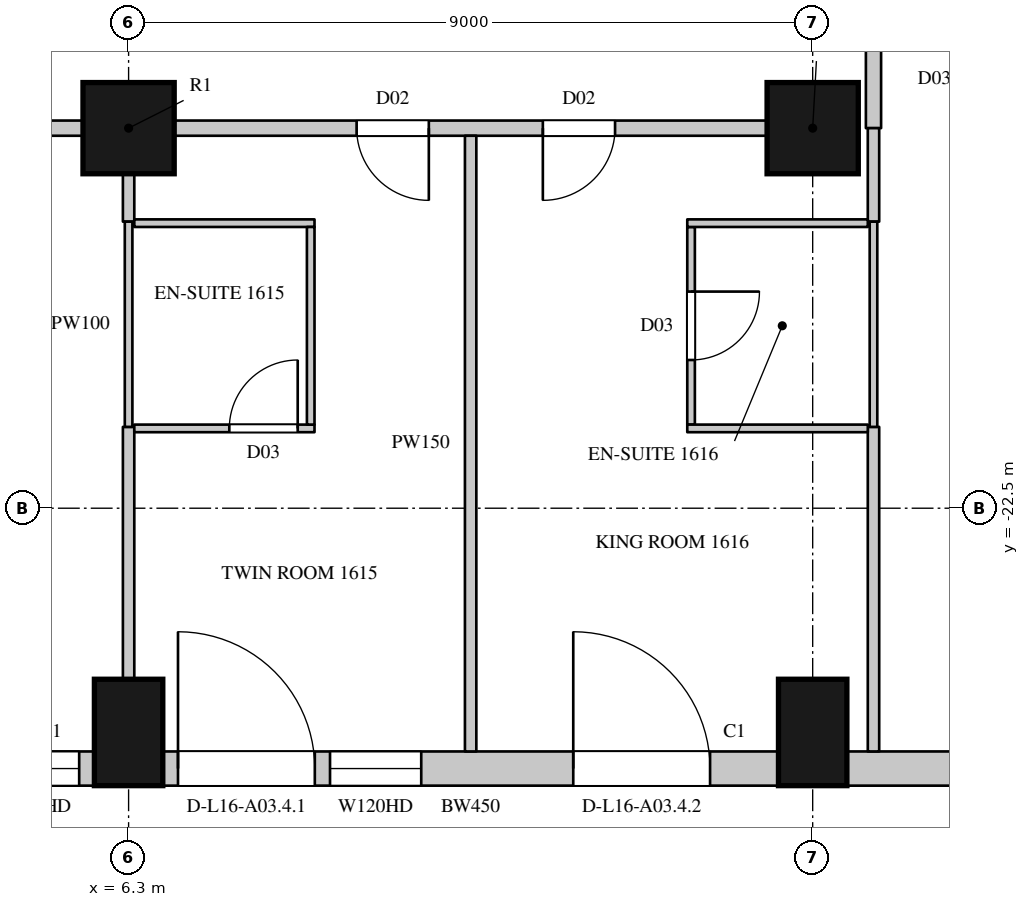
"""IFC4 building model, lengths in metres.
Left out: names, types, materials, properties, quantities, classifications, styles, units other than length and angle.
Written with IfcOpenShell. Run it as: python <this file> out.ifc"""

import sys

from ifc_helpers import new_model, si_unit, direction, frame, frame_2d, origin, origin_2d, place, context, subcontext, project, spatial, rectangle, circle, extrude, element, fill, save


model = new_model("IFC4")
c1 = context("Model", 3, precision=1e-05, world=origin(), true_north=direction((0.0, 1.0)))
c2 = subcontext(c1, "Body", "Model", "MODEL_VIEW")
j1 = project(units=[si_unit("LENGTHUNIT", "METRE"), si_unit("PLANEANGLEUNIT", "RADIAN")], contexts=[c1])
p1 = place(None, origin())
s1 = spatial("IfcSite", under=j1, at=p1, CompositionType="ELEMENT")
p2 = place(p1, origin())
s2 = spatial("IfcBuilding", under=s1, at=p2, CompositionType="ELEMENT")
p3 = place(p2, frame((0.0, 0.0, 87.9)))
s3 = spatial("IfcBuildingStorey", under=s2, at=p3, CompositionType="ELEMENT", Elevation=87.9)
for number, where, z_axis, x_axis in (
    (1, (6.3, -25.45, 0.0), (0.0, 0.0, 1.0), (1.0, 0.0, 0.0)),
    (2, (15.3, -25.45, 0.0), (0.0, 0.0, 1.0), (1.0, 0.0, 0.0)),
):
    element("IfcColumn", number, at=place(p3, frame(where, z_axis=z_axis, x_axis=x_axis)), inside=s3, PredefinedType="COLUMN", context=c2, shape_type="SweptSolid", body=[
        extrude(rectangle(XDim=0.9, YDim=1.4, at=origin_2d()), origin(), (0.0, 0.0, 1.0), 3.6),
    ])
for number, where, z_axis, x_axis in (
    (3, (6.3, -17.5, 0.0), (0.0, 0.0, 1.0), (1.0, 0.0, 0.0)),
    (4, (15.3, -17.5, 0.0), (0.0, 0.0, 1.0), (1.0, 0.0, 0.0)),
):
    element("IfcColumn", number, at=place(p3, frame(where, z_axis=z_axis, x_axis=x_axis)), inside=s3, PredefinedType="COLUMN", context=c2, shape_type="SweptSolid", body=[
        extrude(circle(Radius=0.6, at=origin_2d()), origin(), (0.0, 0.0, 1.0), 3.6),
    ])
p4 = place(p3, frame((-2.25, -25.925, 0.0), z_axis=(0.0, 0.0, 1.0), x_axis=(1.0, 0.0, 0.0)))
e5 = element("IfcWall", 5, at=p4, inside=s3, PredefinedType="SOLIDWALL", context=c2, shape_type="SweptSolid", body=[
    extrude(rectangle(XDim=8.1, YDim=0.45, at=frame_2d((4.05, 0.0))), origin(), (0.0, 0.0, 1.0), 3.3),
])
p5 = place(p4, frame((0.2, 0.0, 0.0)))
e6 = element("IfcOpeningElement", 6, at=p5, cuts=e5, PredefinedType="OPENING", context=c2, shape_type="SweptSolid", body=[
    extrude(rectangle(XDim=1.8, YDim=2.4, at=frame_2d((0.9, 1.2))), frame((0.0, 0.235, 0.0), z_axis=(0.0, -1.0, 0.0), x_axis=(1.0, 0.0, 0.0)), (0.0, 0.0, 1.0), 0.47),
])
p6 = place(p4, frame((2.2, 0.0, 1.05)))
e7 = element("IfcOpeningElement", 7, at=p6, cuts=e5, PredefinedType="OPENING", context=c2, shape_type="SweptSolid", body=[
    extrude(rectangle(XDim=1.2, YDim=2.0, at=frame_2d((0.6, 1.0))), frame((0.0, 0.235, 0.0), z_axis=(0.0, -1.0, 0.0), x_axis=(1.0, 0.0, 0.0)), (0.0, 0.0, 1.0), 0.47),
])
p7 = place(p4, frame((4.7, 0.0, 0.0)))
e8 = element("IfcOpeningElement", 8, at=p7, cuts=e5, PredefinedType="OPENING", context=c2, shape_type="SweptSolid", body=[
    extrude(rectangle(XDim=1.8, YDim=2.4, at=frame_2d((0.9, 1.2))), frame((0.0, 0.235, 0.0), z_axis=(0.0, -1.0, 0.0), x_axis=(1.0, 0.0, 0.0)), (0.0, 0.0, 1.0), 0.47),
])
p8 = place(p4, frame((6.7, 0.0, 1.05)))
e9 = element("IfcOpeningElement", 9, at=p8, cuts=e5, PredefinedType="OPENING", context=c2, shape_type="SweptSolid", body=[
    extrude(rectangle(XDim=1.2, YDim=2.0, at=frame_2d((0.6, 1.0))), frame((0.0, 0.235, 0.0), z_axis=(0.0, -1.0, 0.0), x_axis=(1.0, 0.0, 0.0)), (0.0, 0.0, 1.0), 0.47),
])
p9 = place(p3, frame((6.75, -25.925, 0.0), z_axis=(0.0, 0.0, 1.0), x_axis=(1.0, 0.0, 0.0)))
e10 = element("IfcWall", 10, at=p9, inside=s3, PredefinedType="SOLIDWALL", context=c2, shape_type="SweptSolid", body=[
    extrude(rectangle(XDim=8.1, YDim=0.45, at=frame_2d((4.05, 0.0))), origin(), (0.0, 0.0, 1.0), 3.3),
])
p10 = place(p9, frame((0.2, 0.0, 0.0)))
e11 = element("IfcOpeningElement", 11, at=p10, cuts=e10, PredefinedType="OPENING", context=c2, shape_type="SweptSolid", body=[
    extrude(rectangle(XDim=1.8, YDim=2.4, at=frame_2d((0.9, 1.2))), frame((0.0, 0.235, 0.0), z_axis=(0.0, -1.0, 0.0), x_axis=(1.0, 0.0, 0.0)), (0.0, 0.0, 1.0), 0.47),
])
p11 = place(p9, frame((2.2, 0.0, 1.05)))
e12 = element("IfcOpeningElement", 12, at=p11, cuts=e10, PredefinedType="OPENING", context=c2, shape_type="SweptSolid", body=[
    extrude(rectangle(XDim=1.2, YDim=2.0, at=frame_2d((0.6, 1.0))), frame((0.0, 0.235, 0.0), z_axis=(0.0, -1.0, 0.0), x_axis=(1.0, 0.0, 0.0)), (0.0, 0.0, 1.0), 0.47),
])
p12 = place(p9, frame((5.4, 0.0, 0.0)))
e13 = element("IfcOpeningElement", 13, at=p12, cuts=e10, PredefinedType="OPENING", context=c2, shape_type="SweptSolid", body=[
    extrude(rectangle(XDim=1.8, YDim=2.4, at=frame_2d((0.9, 1.2))), frame((0.0, 0.235, 0.0), z_axis=(0.0, -1.0, 0.0), x_axis=(1.0, 0.0, 0.0)), (0.0, 0.0, 1.0), 0.47),
])
p13 = place(p3, frame((15.75, -25.925, 0.0), z_axis=(0.0, 0.0, 1.0), x_axis=(1.0, 0.0, 0.0)))
e14 = element("IfcWall", 14, at=p13, inside=s3, PredefinedType="SOLIDWALL", context=c2, shape_type="SweptSolid", body=[
    extrude(rectangle(XDim=2.914, YDim=0.45, at=frame_2d((1.457, 0.0))), origin(), (0.0, 0.0, 1.0), 3.3),
])
p14 = place(p3, frame((-2.1, -17.5, 0.0), z_axis=(0.0, 0.0, 1.0), x_axis=(1.0, 0.0, 0.0)))
e15 = element("IfcWall", 15, at=p14, inside=s3, PredefinedType="PARTITIONING", context=c2, shape_type="SweptSolid", body=[
    extrude(rectangle(XDim=7.8, YDim=0.2, at=frame_2d((3.9, 0.0))), origin(), (0.0, 0.0, 1.0), 2.75),
])
p15 = place(p14, frame((4.15, 0.0, 0.0)))
e16 = element("IfcOpeningElement", 16, at=p15, cuts=e15, PredefinedType="OPENING", context=c2, shape_type="SweptSolid", body=[
    extrude(rectangle(XDim=0.95, YDim=2.2, at=frame_2d((0.475, 1.1))), frame((0.0, 0.11, 0.0), z_axis=(0.0, -1.0, 0.0), x_axis=(1.0, 0.0, 0.0)), (0.0, 0.0, 1.0), 0.22),
])
p16 = place(p3, frame((6.9, -17.5, 0.0), z_axis=(0.0, 0.0, 1.0), x_axis=(1.0, 0.0, 0.0)))
e17 = element("IfcWall", 17, at=p16, inside=s3, PredefinedType="PARTITIONING", context=c2, shape_type="SweptSolid", body=[
    extrude(rectangle(XDim=7.8, YDim=0.2, at=frame_2d((3.9, 0.0))), origin(), (0.0, 0.0, 1.0), 2.75),
])
p17 = place(p16, frame((2.4, 0.0, 0.0)))
e18 = element("IfcOpeningElement", 18, at=p17, cuts=e17, PredefinedType="OPENING", context=c2, shape_type="SweptSolid", body=[
    extrude(rectangle(XDim=0.95, YDim=2.2, at=frame_2d((0.475, 1.1))), frame((0.0, 0.11, 0.0), z_axis=(0.0, -1.0, 0.0), x_axis=(1.0, 0.0, 0.0)), (0.0, 0.0, 1.0), 0.22),
])
p18 = place(p16, frame((4.85, 0.0, 0.0)))
e19 = element("IfcOpeningElement", 19, at=p18, cuts=e17, PredefinedType="OPENING", context=c2, shape_type="SweptSolid", body=[
    extrude(rectangle(XDim=0.95, YDim=2.2, at=frame_2d((0.475, 1.1))), frame((0.0, 0.11, 0.0), z_axis=(0.0, -1.0, 0.0), x_axis=(1.0, 0.0, 0.0)), (0.0, 0.0, 1.0), 0.22),
])
p19 = place(p3, frame((16.1, -17.5, 0.0), z_axis=(0.0, 0.0, 1.0), x_axis=(0.0, 1.0, 0.0)))
e20 = element("IfcWall", 20, at=p19, inside=s3, PredefinedType="PARTITIONING", context=c2, shape_type="SweptSolid", body=[
    extrude(rectangle(XDim=12.75, YDim=0.2, at=frame_2d((6.375, 0.0))), origin(), (0.0, 0.0, 1.0), 3.3),
])
p20 = place(p19, frame((2.75, 0.0, 0.0)))
e21 = element("IfcOpeningElement", 21, at=p20, cuts=e20, PredefinedType="OPENING", context=c2, shape_type="SweptSolid", body=[
    extrude(rectangle(XDim=0.95, YDim=2.2, at=frame_2d((0.475, 1.1))), frame((0.0, 0.11, 0.0), z_axis=(0.0, -1.0, 0.0), x_axis=(1.0, 0.0, 0.0)), (0.0, 0.0, 1.0), 0.22),
])
p21 = place(p19, frame((6.95, 0.0, 0.0)))
e22 = element("IfcOpeningElement", 22, at=p21, cuts=e20, PredefinedType="OPENING", context=c2, shape_type="SweptSolid", body=[
    extrude(rectangle(XDim=0.95, YDim=2.2, at=frame_2d((0.475, 1.1))), frame((0.0, 0.11, 0.0), z_axis=(0.0, -1.0, 0.0), x_axis=(1.0, 0.0, 0.0)), (0.0, 0.0, 1.0), 0.22),
])
p22 = place(p19, frame((11.4, 0.0, 0.0)))
e23 = element("IfcOpeningElement", 23, at=p22, cuts=e20, PredefinedType="OPENING", context=c2, shape_type="SweptSolid", body=[
    extrude(rectangle(XDim=0.95, YDim=2.2, at=frame_2d((0.475, 1.1))), frame((0.0, 0.11, 0.0), z_axis=(0.0, -1.0, 0.0), x_axis=(1.0, 0.0, 0.0)), (0.0, 0.0, 1.0), 0.22),
])
p23 = place(p3, frame((6.3, -24.75, 0.0), z_axis=(0.0, 0.0, 1.0), x_axis=(0.0, 1.0, 0.0)))
e24 = element("IfcWall", 24, at=p23, inside=s3, PredefinedType="PARTITIONING", context=c2, shape_type="SweptSolid", body=[
    extrude(rectangle(XDim=3.32, YDim=0.15, at=frame_2d((1.66, 0.0))), origin(), (0.0, 0.0, 1.0), 2.75),
])
p24 = place(p3, frame((6.3, -18.73, 0.0), z_axis=(0.0, 0.0, 1.0), x_axis=(0.0, 1.0, 0.0)))
e25 = element("IfcWall", 25, at=p24, inside=s3, PredefinedType="PARTITIONING", context=c2, shape_type="SweptSolid", body=[
    extrude(rectangle(XDim=0.63, YDim=0.15, at=frame_2d((0.315, 0.0))), origin(), (0.0, 0.0, 1.0), 2.75),
])
p25 = place(p3, frame((10.8, -25.7, 0.0), z_axis=(0.0, 0.0, 1.0), x_axis=(0.0, 1.0, 0.0)))
e26 = element("IfcWall", 26, at=p25, inside=s3, PredefinedType="PARTITIONING", context=c2, shape_type="SweptSolid", body=[
    extrude(rectangle(XDim=8.1, YDim=0.15, at=frame_2d((4.05, 0.0))), origin(), (0.0, 0.0, 1.0), 2.65),
])
p26 = place(p3, frame((16.1, -25.7, 0.0), z_axis=(0.0, 0.0, 1.0), x_axis=(0.0, 1.0, 0.0)))
e27 = element("IfcWall", 27, at=p26, inside=s3, PredefinedType="PARTITIONING", context=c2, shape_type="SweptSolid", body=[
    extrude(rectangle(XDim=4.27, YDim=0.15, at=frame_2d((2.135, 0.0))), origin(), (0.0, 0.0, 1.0), 3.3),
])
p27 = place(p3, frame((16.1, -18.73, 0.0), z_axis=(0.0, 0.0, 1.0), x_axis=(0.0, 1.0, 0.0)))
e28 = element("IfcWall", 28, at=p27, inside=s3, PredefinedType="PARTITIONING", context=c2, shape_type="SweptSolid", body=[
    extrude(rectangle(XDim=1.23, YDim=0.15, at=frame_2d((0.615, 0.0))), origin(), (0.0, 0.0, 1.0), 3.3),
])
p28 = place(p3, frame((6.3, -21.43, 0.0), z_axis=(0.0, 0.0, 1.0), x_axis=(0.0, 1.0, 0.0)))
e29 = element("IfcWall", 29, at=p28, inside=s3, PredefinedType="PARTITIONING", context=c2, shape_type="SweptSolid", body=[
    extrude(rectangle(XDim=2.7, YDim=0.1, at=frame_2d((1.35, 0.0))), origin(), (0.0, 0.0, 1.0), 2.75),
])
p29 = place(p3, frame((6.375, -21.45, 0.0), z_axis=(0.0, 0.0, 1.0), x_axis=(1.0, 0.0, 0.0)))
e30 = element("IfcWall", 30, at=p29, inside=s3, PredefinedType="PARTITIONING", context=c2, shape_type="SweptSolid", body=[
    extrude(rectangle(XDim=2.371, YDim=0.1, at=frame_2d((1.186, 0.0))), origin(), (0.0, 0.0, 1.0), 3.3),
])
p30 = place(p29, frame((1.25, 0.0, 0.0)))
e31 = element("IfcOpeningElement", 31, at=p30, cuts=e30, PredefinedType="OPENING", context=c2, shape_type="SweptSolid", body=[
    extrude(rectangle(XDim=0.9, YDim=2.2, at=frame_2d((0.45, 1.1))), frame((0.0, 0.06, 0.0), z_axis=(0.0, -1.0, 0.0), x_axis=(1.0, 0.0, 0.0)), (0.0, 0.0, 1.0), 0.12),
])
p31 = place(p3, frame((6.375, -18.75, 0.0), z_axis=(0.0, 0.0, 1.0), x_axis=(1.0, 0.0, 0.0)))
e32 = element("IfcWall", 32, at=p31, inside=s3, PredefinedType="PARTITIONING", context=c2, shape_type="SweptSolid", body=[
    extrude(rectangle(XDim=2.371, YDim=0.1, at=frame_2d((1.186, 0.0))), origin(), (0.0, 0.0, 1.0), 3.3),
])
p32 = place(p3, frame((8.696, -21.4, 0.0), z_axis=(0.0, 0.0, 1.0), x_axis=(0.0, 1.0, 0.0)))
e33 = element("IfcWall", 33, at=p32, inside=s3, PredefinedType="PARTITIONING", context=c2, shape_type="SweptSolid", body=[
    extrude(rectangle(XDim=2.6, YDim=0.1, at=frame_2d((1.3, 0.0))), origin(), (0.0, 0.0, 1.0), 3.3),
])
p33 = place(p3, frame((13.7, -21.4, 0.0), z_axis=(0.0, 0.0, 1.0), x_axis=(0.0, 1.0, 0.0)))
e34 = element("IfcWall", 34, at=p33, inside=s3, PredefinedType="PARTITIONING", context=c2, shape_type="SweptSolid", body=[
    extrude(rectangle(XDim=2.6, YDim=0.1, at=frame_2d((1.3, 0.0))), origin(), (0.0, 0.0, 1.0), 3.3),
])
p34 = place(p33, frame((0.85, 0.0, 0.0)))
e35 = element("IfcOpeningElement", 35, at=p34, cuts=e34, PredefinedType="OPENING", context=c2, shape_type="SweptSolid", body=[
    extrude(rectangle(XDim=0.9, YDim=2.2, at=frame_2d((0.45, 1.1))), frame((0.0, 0.06, 0.0), z_axis=(0.0, -1.0, 0.0), x_axis=(1.0, 0.0, 0.0)), (0.0, 0.0, 1.0), 0.12),
])
for number, where, z_axis, x_axis in (
    (36, (13.65, -21.45, 0.0), (0.0, 0.0, 1.0), (1.0, 0.0, 0.0)),
    (37, (13.65, -18.75, 0.0), (0.0, 0.0, 1.0), (1.0, 0.0, 0.0)),
):
    element("IfcWall", number, at=place(p3, frame(where, z_axis=z_axis, x_axis=x_axis)), inside=s3, PredefinedType="PARTITIONING", context=c2, shape_type="SweptSolid", body=[
        extrude(rectangle(XDim=2.375, YDim=0.1, at=frame_2d((1.188, 0.0))), origin(), (0.0, 0.0, 1.0), 3.3),
    ])
p35 = place(p3, frame((16.1, -21.43, 0.0), z_axis=(0.0, 0.0, 1.0), x_axis=(0.0, 1.0, 0.0)))
e38 = element("IfcWall", 38, at=p35, inside=s3, PredefinedType="PARTITIONING", context=c2, shape_type="SweptSolid", body=[
    extrude(rectangle(XDim=2.7, YDim=0.1, at=frame_2d((1.35, 0.0))), origin(), (0.0, 0.0, 1.0), 3.3),
])
p36 = place(p8, origin())
e39 = element("IfcWindow", 39, at=p36, inside=s3, PartitioningType="SINGLE_PANEL", PredefinedType="WINDOW", context=c2, shape_type="SweptSolid", body=[
    extrude(rectangle(XDim=1.2, YDim=2.0, at=frame_2d((0.6, 1.0))), frame((0.0, 0.135, 0.0), z_axis=(0.0, -1.0, 0.0), x_axis=(1.0, 0.0, 0.0)), (0.0, 0.0, 1.0), 0.06),
])
fill(e9, e39)
p37 = place(p10, origin())
e40 = element("IfcDoor", 40, at=p37, inside=s3, OperationType="SLIDING_TO_LEFT", PredefinedType="DOOR", context=c2, shape_type="SweptSolid", body=[
    extrude(rectangle(XDim=1.8, YDim=2.4, at=frame_2d((0.9, 1.2))), frame((0.0, 0.13, 0.0), z_axis=(0.0, -1.0, 0.0), x_axis=(1.0, 0.0, 0.0)), (0.0, 0.0, 1.0), 0.05),
])
fill(e11, e40)
p38 = place(p11, origin())
e41 = element("IfcWindow", 41, at=p38, inside=s3, PartitioningType="SINGLE_PANEL", PredefinedType="WINDOW", context=c2, shape_type="SweptSolid", body=[
    extrude(rectangle(XDim=1.2, YDim=2.0, at=frame_2d((0.6, 1.0))), frame((0.0, 0.135, 0.0), z_axis=(0.0, -1.0, 0.0), x_axis=(1.0, 0.0, 0.0)), (0.0, 0.0, 1.0), 0.06),
])
fill(e12, e41)
p39 = place(p12, origin())
e42 = element("IfcDoor", 42, at=p39, inside=s3, OperationType="SLIDING_TO_LEFT", PredefinedType="DOOR", context=c2, shape_type="SweptSolid", body=[
    extrude(rectangle(XDim=1.8, YDim=2.4, at=frame_2d((0.9, 1.2))), frame((0.0, 0.13, 0.0), z_axis=(0.0, -1.0, 0.0), x_axis=(1.0, 0.0, 0.0)), (0.0, 0.0, 1.0), 0.05),
])
fill(e13, e42)
p40 = place(p17, origin())
e43 = element("IfcDoor", 43, at=p40, inside=s3, OperationType="SINGLE_SWING_LEFT", PredefinedType="DOOR", context=c2, shape_type="SweptSolid", body=[
    extrude(rectangle(XDim=0.95, YDim=2.2, at=frame_2d((0.475, 1.1))), frame((0.0, 0.025, 0.0), z_axis=(0.0, -1.0, 0.0), x_axis=(1.0, 0.0, 0.0)), (0.0, 0.0, 1.0), 0.05),
])
fill(e18, e43)
p41 = place(p30, origin())
e44 = element("IfcDoor", 44, at=p41, inside=s3, OperationType="SINGLE_SWING_RIGHT", PredefinedType="DOOR", context=c2, shape_type="SweptSolid", body=[
    extrude(rectangle(XDim=0.9, YDim=2.2, at=frame_2d((0.45, 1.1))), frame((0.0, 0.025, 0.0), z_axis=(0.0, -1.0, 0.0), x_axis=(1.0, 0.0, 0.0)), (0.0, 0.0, 1.0), 0.05),
])
fill(e31, e44)
p42 = place(p18, origin())
e45 = element("IfcDoor", 45, at=p42, inside=s3, OperationType="SINGLE_SWING_RIGHT", PredefinedType="DOOR", context=c2, shape_type="SweptSolid", body=[
    extrude(rectangle(XDim=0.95, YDim=2.2, at=frame_2d((0.475, 1.1))), frame((0.0, 0.025, 0.0), z_axis=(0.0, -1.0, 0.0), x_axis=(1.0, 0.0, 0.0)), (0.0, 0.0, 1.0), 0.05),
])
fill(e19, e45)
p43 = place(p34, origin())
e46 = element("IfcDoor", 46, at=p43, inside=s3, OperationType="SINGLE_SWING_LEFT", PredefinedType="DOOR", context=c2, shape_type="SweptSolid", body=[
    extrude(rectangle(XDim=0.9, YDim=2.2, at=frame_2d((0.45, 1.1))), frame((0.0, 0.025, 0.0), z_axis=(0.0, -1.0, 0.0), x_axis=(1.0, 0.0, 0.0)), (0.0, 0.0, 1.0), 0.05),
])
fill(e35, e46)
save(model, sys.argv[1])
